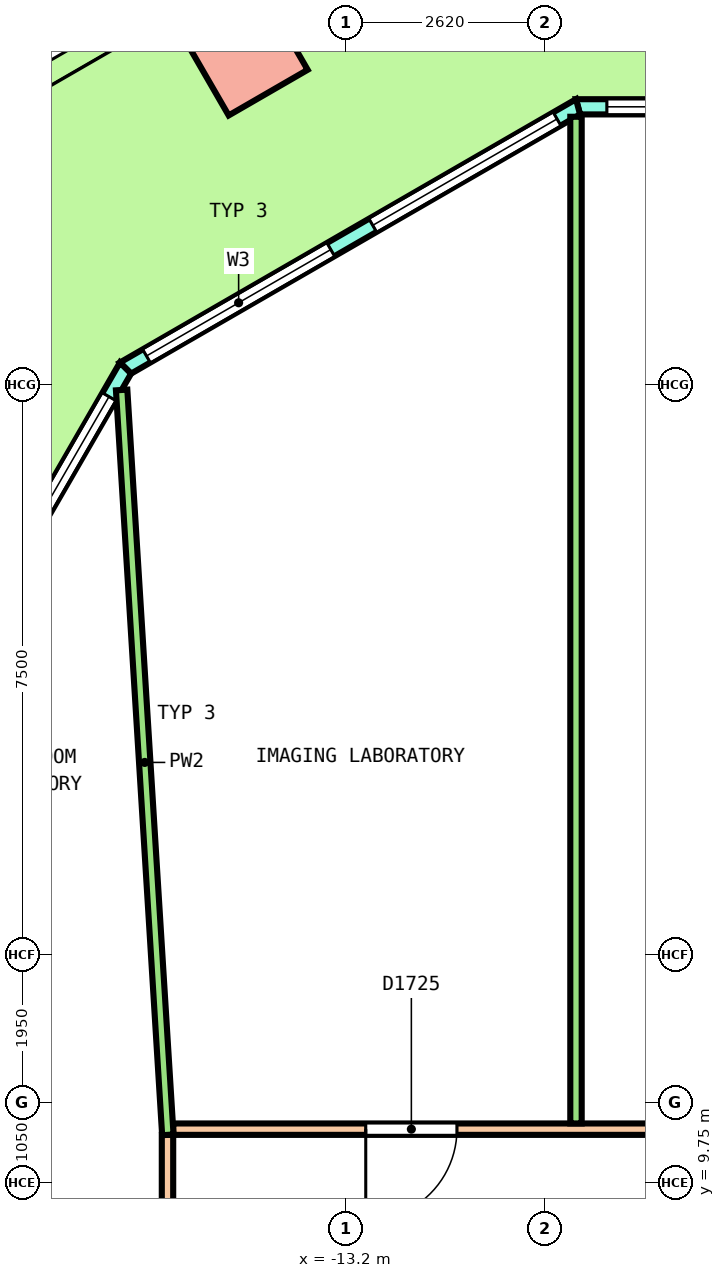
"""IFC4 building model, lengths in metres.
Left out: names, types, materials, properties, quantities, classifications, styles, units other than length and angle.
Written with IfcOpenShell. Run it as: python <this file> out.ifc"""

import sys

from ifc_helpers import new_model, si_unit, direction, frame, frame_2d, origin, origin_2d, place, context, subcontext, project, spatial, polyline, rectangle, outline, extrude, element, fill, save


model = new_model("IFC4")
c1 = context("Model", 3, precision=1e-05, world=origin(), true_north=direction((0.0, 1.0)))
c2 = subcontext(c1, "Body", "Model", "MODEL_VIEW")
j1 = project(units=[si_unit("LENGTHUNIT", "METRE"), si_unit("PLANEANGLEUNIT", "RADIAN")], contexts=[c1])
p1 = place(None, origin())
s1 = spatial("IfcSite", under=j1, at=p1, CompositionType="ELEMENT")
p2 = place(p1, origin())
s2 = spatial("IfcBuilding", under=s1, at=p2, CompositionType="ELEMENT")
p3 = place(p2, frame((0.0, 0.0, 154.0)))
s3 = spatial("IfcBuildingStorey", under=s2, at=p3, CompositionType="ELEMENT", Elevation=154.0)
p4 = place(p3, frame((-14.526, 24.606, 0.0), z_axis=(-0.036265236264, 0.0, 0.999342199969), x_axis=(-0.865313546461, -0.500246354177, -0.031401456084)))
e1 = element("IfcColumn", 1, at=p4, inside=s3, PredefinedType="COLUMN", context=c2, shape_type="SweptSolid", body=[
    extrude(rectangle(XDim=1.2, YDim=1.2, at=origin_2d()), origin(), (0.0, 0.0, 1.0), 4.053),
])
p5 = place(p3, frame((10.149, 23.9, 0.0), z_axis=(0.0, 0.0, 1.0), x_axis=(-1.0, 0.0, 0.0)))
e2 = element("IfcWall", 2, at=p5, inside=s3, PredefinedType="SOLIDWALL", context=c2, shape_type="SweptSolid", body=[
    extrude(outline(polyline([(-0.027, -0.1), (0.991, -0.1), (2.008, -0.1), (3.026, -0.1), (4.043, -0.1), (5.061, -0.1), (6.079, -0.1), (7.096, -0.1), (8.114, -0.1), (9.131, -0.1), (10.149, -0.1), (11.167, -0.1), (12.184, -0.1), (13.202, -0.1), (14.219, -0.1), (15.237, -0.1), (16.254, -0.1), (17.272, -0.1), (18.29, -0.1), (19.307, -0.1), (20.325, -0.1), (20.271, 0.1), (19.259, 0.1), (18.247, 0.1), (17.234, 0.1), (16.222, 0.1), (15.21, 0.1), (14.198, 0.1), (13.186, 0.1), (12.173, 0.1), (11.161, 0.1), (10.149, 0.1), (9.137, 0.1), (8.125, 0.1), (7.112, 0.1), (6.1, 0.1), (5.088, 0.1), (4.076, 0.1), (3.063, 0.1), (2.051, 0.1), (1.039, 0.1), (0.027, 0.1), (-0.027, -0.1)])), origin(), (0.0, 0.0, 1.0), 4.1),
])
p6 = place(p5, frame((0.38, 0.0, 0.1)))
e3 = element("IfcOpeningElement", 3, at=p6, cuts=e2, PredefinedType="OPENING", context=c2, shape_type="SweptSolid", body=[
    extrude(rectangle(XDim=3.3, YDim=2.9, at=frame_2d((1.65, 1.45))), frame((0.0, 0.11, 0.0), z_axis=(0.0, -1.0, 0.0), x_axis=(1.0, 0.0, 0.0)), (0.0, 0.0, 1.0), 0.22),
])
p7 = place(p5, frame((4.439, 0.0, 0.1)))
e4 = element("IfcOpeningElement", 4, at=p7, cuts=e2, PredefinedType="OPENING", context=c2, shape_type="SweptSolid", body=[
    extrude(rectangle(XDim=3.3, YDim=2.9, at=frame_2d((1.65, 1.45))), frame((0.0, 0.11, 0.0), z_axis=(0.0, -1.0, 0.0), x_axis=(1.0, 0.0, 0.0)), (0.0, 0.0, 1.0), 0.22),
])
p8 = place(p5, frame((9.249, 0.0, 0.0)))
e5 = element("IfcOpeningElement", 5, at=p8, cuts=e2, PredefinedType="OPENING", context=c2, shape_type="SweptSolid", body=[
    extrude(rectangle(XDim=1.8, YDim=2.4, at=frame_2d((0.9, 1.2))), frame((0.0, 0.11, 0.0), z_axis=(0.0, -1.0, 0.0), x_axis=(1.0, 0.0, 0.0)), (0.0, 0.0, 1.0), 0.22),
])
p9 = place(p5, frame((9.249, 0.0, 2.55)))
e6 = element("IfcOpeningElement", 6, at=p9, cuts=e2, PredefinedType="OPENING", context=c2, shape_type="SweptSolid", body=[
    extrude(rectangle(XDim=1.8, YDim=0.45, at=frame_2d((0.9, 0.225))), frame((0.0, 0.11, 0.0), z_axis=(0.0, -1.0, 0.0), x_axis=(1.0, 0.0, 0.0)), (0.0, 0.0, 1.0), 0.22),
])
p10 = place(p5, frame((12.559, 0.0, 0.1)))
e7 = element("IfcOpeningElement", 7, at=p10, cuts=e2, PredefinedType="OPENING", context=c2, shape_type="SweptSolid", body=[
    extrude(rectangle(XDim=3.3, YDim=2.9, at=frame_2d((1.65, 1.45))), frame((0.0, 0.11, 0.0), z_axis=(0.0, -1.0, 0.0), x_axis=(1.0, 0.0, 0.0)), (0.0, 0.0, 1.0), 0.22),
])
p11 = place(p5, frame((16.618, 0.0, 0.1)))
e8 = element("IfcOpeningElement", 8, at=p11, cuts=e2, PredefinedType="OPENING", context=c2, shape_type="SweptSolid", body=[
    extrude(rectangle(XDim=3.3, YDim=2.9, at=frame_2d((1.65, 1.45))), frame((0.0, 0.11, 0.0), z_axis=(0.0, -1.0, 0.0), x_axis=(1.0, 0.0, 0.0)), (0.0, 0.0, 1.0), 0.22),
])
p12 = place(p3, frame((-10.149, 23.9, 0.0), z_axis=(0.0, 0.0, 1.0), x_axis=(-0.866029458321, -0.49999297727, 0.0)))
e9 = element("IfcWall", 9, at=p12, inside=s3, PredefinedType="SOLIDWALL", context=c2, shape_type="SweptSolid", body=[
    extrude(outline(polyline([(-0.027, -0.1), (1.128, -0.1), (2.282, -0.1), (3.437, -0.1), (4.592, -0.1), (5.747, -0.1), (6.901, -0.1), (6.848, 0.1), (5.711, 0.1), (4.574, 0.1), (3.437, 0.1), (2.301, 0.1), (1.164, 0.1), (0.027, 0.1), (-0.027, -0.1)])), origin(), (0.0, 0.0, 1.0), 4.1),
])
p13 = place(p12, frame((0.319, 0.0, 0.1)))
e10 = element("IfcOpeningElement", 10, at=p13, cuts=e9, PredefinedType="OPENING", context=c2, shape_type="SweptSolid", body=[
    extrude(rectangle(XDim=2.8, YDim=2.9, at=frame_2d((1.4, 1.45))), frame((0.0, 0.11, 0.0), z_axis=(0.0, -1.0, 0.0), x_axis=(1.0, 0.0, 0.0)), (0.0, 0.0, 1.0), 0.22),
])
p14 = place(p12, frame((3.756, 0.0, 0.1)))
e11 = element("IfcOpeningElement", 11, at=p14, cuts=e9, PredefinedType="OPENING", context=c2, shape_type="SweptSolid", body=[
    extrude(rectangle(XDim=2.8, YDim=2.9, at=frame_2d((1.4, 1.45))), frame((0.0, 0.11, 0.0), z_axis=(0.0, -1.0, 0.0), x_axis=(1.0, 0.0, 0.0)), (0.0, 0.0, 1.0), 0.22),
])
p15 = place(p3, frame((-16.103, 20.463, 0.0), z_axis=(0.0, 0.0, 1.0), x_axis=(-0.500000373815, -0.866025187962, 0.0)))
e12 = element("IfcWall", 12, at=p15, inside=s3, PredefinedType="SOLIDWALL", context=c2, shape_type="SweptSolid", body=[
    extrude(outline(polyline([(-0.027, -0.1), (0.994, -0.1), (2.015, -0.1), (3.035, -0.1), (4.056, -0.1), (5.077, -0.1), (6.097, -0.1), (7.118, -0.1), (8.139, -0.1), (9.16, -0.1), (10.18, -0.1), (11.201, -0.1), (12.222, -0.1), (13.242, -0.1), (14.263, -0.1), (15.284, -0.1), (16.304, -0.1), (17.325, -0.1), (18.346, -0.1), (19.367, -0.1), (19.313, 0.1), (18.298, 0.1), (17.283, 0.1), (16.268, 0.1), (15.253, 0.1), (14.238, 0.1), (13.223, 0.1), (12.208, 0.1), (11.193, 0.1), (10.177, 0.1), (9.162, 0.1), (8.147, 0.1), (7.132, 0.1), (6.117, 0.1), (5.102, 0.1), (4.087, 0.1), (3.072, 0.1), (2.057, 0.1), (1.042, 0.1), (0.027, 0.1), (-0.027, -0.1)])), origin(), (0.0, 0.0, 1.0), 4.1),
])
p16 = place(p15, frame((0.434, 0.0, 0.1)))
e13 = element("IfcOpeningElement", 13, at=p16, cuts=e12, PredefinedType="OPENING", context=c2, shape_type="SweptSolid", body=[
    extrude(rectangle(XDim=3.0, YDim=2.9, at=frame_2d((1.5, 1.45))), frame((0.0, 0.11, 0.0), z_axis=(0.0, -1.0, 0.0), x_axis=(1.0, 0.0, 0.0)), (0.0, 0.0, 1.0), 0.22),
])
p17 = place(p15, frame((4.302, 0.0, 0.1)))
e14 = element("IfcOpeningElement", 14, at=p17, cuts=e12, PredefinedType="OPENING", context=c2, shape_type="SweptSolid", body=[
    extrude(rectangle(XDim=3.0, YDim=2.9, at=frame_2d((1.5, 1.45))), frame((0.0, 0.11, 0.0), z_axis=(0.0, -1.0, 0.0), x_axis=(1.0, 0.0, 0.0)), (0.0, 0.0, 1.0), 0.22),
])
p18 = place(p15, frame((8.77, 0.0, 0.0)))
e15 = element("IfcOpeningElement", 15, at=p18, cuts=e12, PredefinedType="OPENING", context=c2, shape_type="SweptSolid", body=[
    extrude(rectangle(XDim=1.8, YDim=2.4, at=frame_2d((0.9, 1.2))), frame((0.0, 0.11, 0.0), z_axis=(0.0, -1.0, 0.0), x_axis=(1.0, 0.0, 0.0)), (0.0, 0.0, 1.0), 0.22),
])
p19 = place(p15, frame((8.77, 0.0, 2.55)))
e16 = element("IfcOpeningElement", 16, at=p19, cuts=e12, PredefinedType="OPENING", context=c2, shape_type="SweptSolid", body=[
    extrude(rectangle(XDim=1.8, YDim=0.45, at=frame_2d((0.9, 0.225))), frame((0.0, 0.11, 0.0), z_axis=(0.0, -1.0, 0.0), x_axis=(1.0, 0.0, 0.0)), (0.0, 0.0, 1.0), 0.22),
])
p20 = place(p15, frame((12.038, 0.0, 0.1)))
e17 = element("IfcOpeningElement", 17, at=p20, cuts=e12, PredefinedType="OPENING", context=c2, shape_type="SweptSolid", body=[
    extrude(rectangle(XDim=3.0, YDim=2.9, at=frame_2d((1.5, 1.45))), frame((0.0, 0.11, 0.0), z_axis=(0.0, -1.0, 0.0), x_axis=(1.0, 0.0, 0.0)), (0.0, 0.0, 1.0), 0.22),
])
p21 = place(p15, frame((15.906, 0.0, 0.1)))
e18 = element("IfcOpeningElement", 18, at=p21, cuts=e12, PredefinedType="OPENING", context=c2, shape_type="SweptSolid", body=[
    extrude(rectangle(XDim=3.0, YDim=2.9, at=frame_2d((1.5, 1.45))), frame((0.0, 0.11, 0.0), z_axis=(0.0, -1.0, 0.0), x_axis=(1.0, 0.0, 0.0)), (0.0, 0.0, 1.0), 0.22),
])
p22 = place(p3, frame((-15.475, 10.45, 0.0), z_axis=(0.0, 0.0, 1.0), x_axis=(1.0, 0.0, 0.0)))
e19 = element("IfcWall", 19, at=p22, inside=s3, PredefinedType="PARTITIONING", context=c2, shape_type="SweptSolid", body=[
    extrude(rectangle(XDim=31.1, YDim=0.15, at=frame_2d((15.55, 0.0))), origin(), (0.0, 0.0, 1.0), 3.05),
])
p23 = place(p22, frame((25.808, 0.0, 0.0)))
e20 = element("IfcOpeningElement", 20, at=p23, cuts=e19, PredefinedType="OPENING", context=c2, shape_type="SweptSolid", body=[
    extrude(rectangle(XDim=1.2, YDim=2.1, at=frame_2d((0.6, 1.05))), frame((0.0, 0.085, 0.0), z_axis=(0.0, -1.0, 0.0), x_axis=(1.0, 0.0, 0.0)), (0.0, 0.0, 1.0), 0.17),
])
p24 = place(p22, frame((14.997, 0.0, 0.0)))
e21 = element("IfcOpeningElement", 21, at=p24, cuts=e19, PredefinedType="OPENING", context=c2, shape_type="SweptSolid", body=[
    extrude(rectangle(XDim=1.2, YDim=2.1, at=frame_2d((0.6, 1.05))), frame((0.0, 0.085, 0.0), z_axis=(0.0, -1.0, 0.0), x_axis=(1.0, 0.0, 0.0)), (0.0, 0.0, 1.0), 0.17),
])
p25 = place(p22, frame((2.533, 0.0, 0.0)))
e22 = element("IfcOpeningElement", 22, at=p25, cuts=e19, PredefinedType="OPENING", context=c2, shape_type="SweptSolid", body=[
    extrude(rectangle(XDim=1.2, YDim=2.1, at=frame_2d((0.6, 1.05))), frame((0.0, 0.085, 0.0), z_axis=(0.0, -1.0, 0.0), x_axis=(1.0, 0.0, 0.0)), (0.0, 0.0, 1.0), 0.17),
])
p26 = place(p3, frame((-15.55, -0.68, 0.0), z_axis=(0.0, 0.0, 1.0), x_axis=(0.0, 1.0, 0.0)))
e23 = element("IfcWall", 23, at=p26, inside=s3, PredefinedType="PARTITIONING", context=c2, shape_type="SweptSolid", body=[
    extrude(rectangle(XDim=11.055, YDim=0.15, at=frame_2d((5.528, 0.0))), origin(), (0.0, 0.0, 1.0), 3.05),
])
p27 = place(p26, frame((7.176, 0.0, 0.0)))
e24 = element("IfcOpeningElement", 24, at=p27, cuts=e23, PredefinedType="OPENING", context=c2, shape_type="SweptSolid", body=[
    extrude(rectangle(XDim=1.2, YDim=2.1, at=frame_2d((0.6, 1.05))), frame((0.0, 0.085, 0.0), z_axis=(0.0, -1.0, 0.0), x_axis=(1.0, 0.0, 0.0)), (0.0, 0.0, 1.0), 0.17),
])
p28 = place(p3, frame((-10.176, 10.525, 0.0), z_axis=(0.0, 0.0, 1.0), x_axis=(0.0, 1.0, 0.0)))
e25 = element("IfcWall", 25, at=p28, inside=s3, PredefinedType="PARTITIONING", context=c2, shape_type="SweptSolid", body=[
    extrude(rectangle(XDim=13.244, YDim=0.15, at=frame_2d((6.622, 0.0))), origin(), (0.0, 0.0, 1.0), 3.05),
])
p29 = place(p3, frame((-16.153, 20.175, 0.0), z_axis=(0.0, 0.0, 1.0), x_axis=(0.061913874549, -0.99808149574, 0.0)))
e26 = element("IfcWall", 26, at=p29, inside=s3, PredefinedType="PARTITIONING", context=c2, shape_type="SweptSolid", body=[
    extrude(rectangle(XDim=9.819, YDim=0.15, at=frame_2d((4.909, 0.0))), origin(), (0.0, 0.0, 1.0), 3.05),
])
p30 = place(p11, origin())
e27 = element("IfcWindow", 27, at=p30, inside=s3, PartitioningType="SINGLE_PANEL", PredefinedType="WINDOW", context=c2, shape_type="SweptSolid", body=[
    extrude(rectangle(XDim=3.3, YDim=2.9, at=frame_2d((1.65, 1.45))), frame((0.0, 0.03, 0.0), z_axis=(0.0, -1.0, 0.0), x_axis=(1.0, 0.0, 0.0)), (0.0, 0.0, 1.0), 0.06),
])
fill(e8, e27)
p31 = place(p13, origin())
e28 = element("IfcWindow", 28, at=p31, inside=s3, PartitioningType="SINGLE_PANEL", PredefinedType="WINDOW", context=c2, shape_type="SweptSolid", body=[
    extrude(rectangle(XDim=2.8, YDim=2.9, at=frame_2d((1.4, 1.45))), frame((0.0, 0.03, 0.0), z_axis=(0.0, -1.0, 0.0), x_axis=(1.0, 0.0, 0.0)), (0.0, 0.0, 1.0), 0.06),
])
fill(e10, e28)
p32 = place(p14, origin())
e29 = element("IfcWindow", 29, at=p32, inside=s3, PartitioningType="SINGLE_PANEL", PredefinedType="WINDOW", context=c2, shape_type="SweptSolid", body=[
    extrude(rectangle(XDim=2.8, YDim=2.9, at=frame_2d((1.4, 1.45))), frame((0.0, 0.03, 0.0), z_axis=(0.0, -1.0, 0.0), x_axis=(1.0, 0.0, 0.0)), (0.0, 0.0, 1.0), 0.06),
])
fill(e11, e29)
p33 = place(p16, origin())
e30 = element("IfcWindow", 30, at=p33, inside=s3, PartitioningType="SINGLE_PANEL", PredefinedType="WINDOW", context=c2, shape_type="SweptSolid", body=[
    extrude(rectangle(XDim=3.0, YDim=2.9, at=frame_2d((1.5, 1.45))), frame((0.0, 0.03, 0.0), z_axis=(0.0, -1.0, 0.0), x_axis=(1.0, 0.0, 0.0)), (0.0, 0.0, 1.0), 0.06),
])
fill(e13, e30)
p34 = place(p25, origin())
e31 = element("IfcDoor", 31, at=p34, inside=s3, OperationType="DOUBLE_DOOR_SINGLE_SWING", PredefinedType="DOOR", context=c2, shape_type="SweptSolid", body=[
    extrude(rectangle(XDim=1.2, YDim=2.1, at=frame_2d((0.6, 1.05))), frame((0.0, 0.025, 0.0), z_axis=(0.0, -1.0, 0.0), x_axis=(1.0, 0.0, 0.0)), (0.0, 0.0, 1.0), 0.05),
])
fill(e22, e31)
save(model, sys.argv[1])
